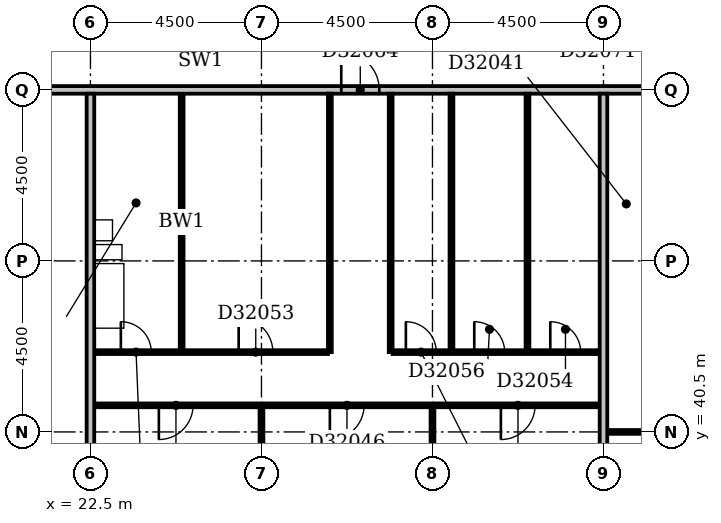
"""IFC4 building model, lengths in metres.
Left out: names, types, materials, properties, quantities, classifications, styles, units other than length and angle.
Written with IfcOpenShell. Run it as: python <this file> out.ifc"""

import sys

from ifc_helpers import new_model, si_unit, direction, frame, frame_2d, origin, place, context, subcontext, project, spatial, rectangle, extrude, element, fill, save


model = new_model("IFC4")
c1 = context("Model", 3, precision=1e-05, world=origin(), true_north=direction((0.0, 1.0)))
c2 = subcontext(c1, "Body", "Model", "MODEL_VIEW")
j1 = project(units=[si_unit("LENGTHUNIT", "METRE"), si_unit("PLANEANGLEUNIT", "RADIAN")], contexts=[c1])
p1 = place(None, origin())
s1 = spatial("IfcSite", under=j1, at=p1, CompositionType="ELEMENT")
p2 = place(p1, origin())
s2 = spatial("IfcBuilding", under=s1, at=p2, CompositionType="ELEMENT")
p3 = place(p2, frame((0.0, 0.0, 130.4)))
s3 = spatial("IfcBuildingStorey", under=s2, at=p3, CompositionType="ELEMENT", Elevation=130.4)
p4 = place(p3, frame((22.5, 36.5, 0.0), z_axis=(0.0, 0.0, 1.0), x_axis=(0.0, 1.0, 0.0)))
e1 = element("IfcWall", 1, at=p4, inside=s3, PredefinedType="PARTITIONING", context=c2, shape_type="SweptSolid", body=[
    extrude(rectangle(XDim=12.9, YDim=0.2, at=frame_2d((6.45, 0.0))), origin(), (0.0, 0.0, 1.0), 3.3),
])
p5 = place(p3, frame((27.0, 36.5, 0.0), z_axis=(0.0, 0.0, 1.0), x_axis=(0.0, 1.0, 0.0)))
e2 = element("IfcWall", 2, at=p5, inside=s3, PredefinedType="PARTITIONING", context=c2, shape_type="SweptSolid", body=[
    extrude(rectangle(XDim=4.65, YDim=0.1, at=frame_2d((2.325, 0.0))), origin(), (0.0, 0.0, 1.0), 2.6),
])
p6 = place(p3, frame((31.5, 36.5, 0.0), z_axis=(0.0, 0.0, 1.0), x_axis=(0.0, 1.0, 0.0)))
e3 = element("IfcWall", 3, at=p6, inside=s3, PredefinedType="PARTITIONING", context=c2, shape_type="SweptSolid", body=[
    extrude(rectangle(XDim=4.65, YDim=0.1, at=frame_2d((2.325, 0.0))), origin(), (0.0, 0.0, 1.0), 3.3),
])
p7 = place(p3, frame((36.0, 36.5, 0.0), z_axis=(0.0, 0.0, 1.0), x_axis=(0.0, 1.0, 0.0)))
e4 = element("IfcWall", 4, at=p7, inside=s3, PredefinedType="PARTITIONING", context=c2, shape_type="SweptSolid", body=[
    extrude(rectangle(XDim=12.9, YDim=0.2, at=frame_2d((6.45, 0.0))), origin(), (0.0, 0.0, 1.0), 2.4),
])
p8 = place(p3, frame((36.1, 40.5, 0.0), z_axis=(0.0, 0.0, 1.0), x_axis=(1.0, 0.0, 0.0)))
e5 = element("IfcWall", 5, at=p8, inside=s3, PredefinedType="PARTITIONING", context=c2, shape_type="SweptSolid", body=[
    extrude(rectangle(XDim=4.3, YDim=0.1, at=frame_2d((2.15, 0.0))), origin(), (0.0, 0.0, 1.0), 3.3),
])
p9 = place(p8, frame((1.7, 0.0, 0.0)))
e6 = element("IfcOpeningElement", 6, at=p9, cuts=e5, PredefinedType="OPENING", context=c2, shape_type="SweptSolid", body=[
    extrude(rectangle(XDim=0.9, YDim=2.1, at=frame_2d((0.45, 1.05))), frame((0.0, 0.062, 0.0), z_axis=(0.0, -1.0, 0.0), x_axis=(1.0, 0.0, 0.0)), (0.0, 0.0, 1.0), 0.124),
])
p10 = place(p3, frame((22.6, 41.2, 0.0), z_axis=(0.0, 0.0, 1.0), x_axis=(1.0, 0.0, 0.0)))
e7 = element("IfcWall", 7, at=p10, inside=s3, PredefinedType="PARTITIONING", context=c2, shape_type="SweptSolid", body=[
    extrude(rectangle(XDim=13.3, YDim=0.1, at=frame_2d((6.65, 0.0))), origin(), (0.0, 0.0, 1.0), 3.3),
])
p11 = place(p10, frame((1.7, 0.0, 0.0)))
e8 = element("IfcOpeningElement", 8, at=p11, cuts=e7, PredefinedType="OPENING", context=c2, shape_type="SweptSolid", body=[
    extrude(rectangle(XDim=0.9, YDim=2.1, at=frame_2d((0.45, 1.05))), frame((0.0, 0.062, 0.0), z_axis=(0.0, -1.0, 0.0), x_axis=(1.0, 0.0, 0.0)), (0.0, 0.0, 1.0), 0.124),
])
p12 = place(p10, frame((6.2, 0.0, 0.0)))
e9 = element("IfcOpeningElement", 9, at=p12, cuts=e7, PredefinedType="OPENING", context=c2, shape_type="SweptSolid", body=[
    extrude(rectangle(XDim=0.9, YDim=2.1, at=frame_2d((0.45, 1.05))), frame((0.0, 0.062, 0.0), z_axis=(0.0, -1.0, 0.0), x_axis=(1.0, 0.0, 0.0)), (0.0, 0.0, 1.0), 0.124),
])
p13 = place(p10, frame((10.7, 0.0, 0.0)))
e10 = element("IfcOpeningElement", 10, at=p13, cuts=e7, PredefinedType="OPENING", context=c2, shape_type="SweptSolid", body=[
    extrude(rectangle(XDim=0.9, YDim=2.1, at=frame_2d((0.45, 1.05))), frame((0.0, 0.062, 0.0), z_axis=(0.0, -1.0, 0.0), x_axis=(1.0, 0.0, 0.0)), (0.0, 0.0, 1.0), 0.124),
])
p14 = place(p3, frame((22.6, 42.6, 0.0), z_axis=(0.0, 0.0, 1.0), x_axis=(1.0, 0.0, 0.0)))
e11 = element("IfcWall", 11, at=p14, inside=s3, PredefinedType="PARTITIONING", context=c2, shape_type="SweptSolid", body=[
    extrude(rectangle(XDim=6.15, YDim=0.1, at=frame_2d((3.075, 0.0))), origin(), (0.0, 0.0, 1.0), 3.3),
])
p15 = place(p14, frame((0.7, 0.0, 0.0)))
e12 = element("IfcOpeningElement", 12, at=p15, cuts=e11, PredefinedType="OPENING", context=c2, shape_type="SweptSolid", body=[
    extrude(rectangle(XDim=0.8, YDim=2.1, at=frame_2d((0.4, 1.05))), frame((0.0, 0.062, 0.0), z_axis=(0.0, -1.0, 0.0), x_axis=(1.0, 0.0, 0.0)), (0.0, 0.0, 1.0), 0.124),
])
p16 = place(p14, frame((3.8, 0.0, 0.0)))
e13 = element("IfcOpeningElement", 13, at=p16, cuts=e11, PredefinedType="OPENING", context=c2, shape_type="SweptSolid", body=[
    extrude(rectangle(XDim=0.9, YDim=2.1, at=frame_2d((0.45, 1.05))), frame((0.0, 0.062, 0.0), z_axis=(0.0, -1.0, 0.0), x_axis=(1.0, 0.0, 0.0)), (0.0, 0.0, 1.0), 0.124),
])
for number, where, z_axis, x_axis in (
    (14, (28.8, 42.6, 0.0), (0.0, 0.0, 1.0), (0.0, 1.0, 0.0)),
    (15, (30.4, 42.6, 0.0), (0.0, 0.0, 1.0), (0.0, 1.0, 0.0)),
):
    element("IfcWall", number, at=place(p3, frame(where, z_axis=z_axis, x_axis=x_axis)), inside=s3, PredefinedType="PARTITIONING", context=c2, shape_type="SweptSolid", body=[
        extrude(rectangle(XDim=6.8, YDim=0.1, at=frame_2d((3.4, 0.0))), origin(), (0.0, 0.0, 1.0), 3.3),
    ])
p17 = place(p3, frame((30.45, 42.6, 0.0), z_axis=(0.0, 0.0, 1.0), x_axis=(1.0, 0.0, 0.0)))
e16 = element("IfcWall", 16, at=p17, inside=s3, PredefinedType="PARTITIONING", context=c2, shape_type="SweptSolid", body=[
    extrude(rectangle(XDim=5.45, YDim=0.1, at=frame_2d((2.725, 0.0))), origin(), (0.0, 0.0, 1.0), 3.3),
])
p18 = place(p17, frame((4.15, 0.0, 0.0)))
e17 = element("IfcOpeningElement", 17, at=p18, cuts=e16, PredefinedType="OPENING", context=c2, shape_type="SweptSolid", body=[
    extrude(rectangle(XDim=0.8, YDim=2.1, at=frame_2d((0.4, 1.05))), frame((0.0, 0.062, 0.0), z_axis=(0.0, -1.0, 0.0), x_axis=(1.0, 0.0, 0.0)), (0.0, 0.0, 1.0), 0.124),
])
p19 = place(p17, frame((0.35, 0.0, 0.0)))
e18 = element("IfcOpeningElement", 18, at=p19, cuts=e16, PredefinedType="OPENING", context=c2, shape_type="SweptSolid", body=[
    extrude(rectangle(XDim=0.8, YDim=2.1, at=frame_2d((0.4, 1.05))), frame((0.0, 0.062, 0.0), z_axis=(0.0, -1.0, 0.0), x_axis=(1.0, 0.0, 0.0)), (0.0, 0.0, 1.0), 0.124),
])
p20 = place(p17, frame((2.15, 0.0, 0.0)))
e19 = element("IfcOpeningElement", 19, at=p20, cuts=e16, PredefinedType="OPENING", context=c2, shape_type="SweptSolid", body=[
    extrude(rectangle(XDim=0.8, YDim=2.1, at=frame_2d((0.4, 1.05))), frame((0.0, 0.062, 0.0), z_axis=(0.0, -1.0, 0.0), x_axis=(1.0, 0.0, 0.0)), (0.0, 0.0, 1.0), 0.124),
])
p21 = place(p3, frame((24.9, 42.65, 0.0), z_axis=(0.0, 0.0, 1.0), x_axis=(0.0, 1.0, 0.0)))
e20 = element("IfcWall", 20, at=p21, inside=s3, PredefinedType="PLUMBINGWALL", context=c2, shape_type="SweptSolid", body=[
    extrude(rectangle(XDim=6.75, YDim=0.1, at=frame_2d((3.375, 0.0))), origin(), (0.0, 0.0, 1.0), 3.3),
])
for number, where, z_axis, x_axis in (
    (21, (32.0, 42.65, 0.0), (0.0, 0.0, 1.0), (0.0, 1.0, 0.0)),
    (22, (34.0, 42.65, 0.0), (0.0, 0.0, 1.0), (0.0, 1.0, 0.0)),
):
    element("IfcWall", number, at=place(p3, frame(where, z_axis=z_axis, x_axis=x_axis)), inside=s3, PredefinedType="PARTITIONING", context=c2, shape_type="SweptSolid", body=[
        extrude(rectangle(XDim=6.75, YDim=0.1, at=frame_2d((3.375, 0.0))), origin(), (0.0, 0.0, 1.0), 3.3),
    ])
p22 = place(p3, frame((9.1, 49.5, 0.0), z_axis=(0.0, 0.0, 1.0), x_axis=(1.0, 0.0, 0.0)))
e23 = element("IfcWall", 23, at=p22, inside=s3, PredefinedType="PARTITIONING", context=c2, shape_type="SweptSolid", body=[
    extrude(rectangle(XDim=28.05, YDim=0.2, at=frame_2d((14.025, 0.0))), origin(), (0.0, 0.0, 1.0), 3.3),
])
p23 = place(p22, frame((20.0, 0.0, 0.0)))
e24 = element("IfcOpeningElement", 24, at=p23, cuts=e23, PredefinedType="OPENING", context=c2, shape_type="SweptSolid", body=[
    extrude(rectangle(XDim=1.0, YDim=2.1, at=frame_2d((0.5, 1.05))), frame((0.0, 0.112, 0.0), z_axis=(0.0, -1.0, 0.0), x_axis=(1.0, 0.0, 0.0)), (0.0, 0.0, 1.0), 0.224),
])
p24 = place(p22, frame((3.9, 0.0, 0.0)))
e25 = element("IfcOpeningElement", 25, at=p24, cuts=e23, PredefinedType="OPENING", context=c2, shape_type="SweptSolid", body=[
    extrude(rectangle(XDim=0.9, YDim=2.1, at=frame_2d((0.45, 1.05))), frame((0.0, 0.112, 0.0), z_axis=(0.0, -1.0, 0.0), x_axis=(1.0, 0.0, 0.0)), (0.0, 0.0, 1.0), 0.224),
])
p25 = place(p11, frame((0.9, 0.0, 0.0), z_axis=(0.0, 0.0, 1.0), x_axis=(-1.0, 0.0, 0.0)))
e26 = element("IfcDoor", 26, at=p25, inside=s3, OperationType="SINGLE_SWING_RIGHT", PredefinedType="DOOR", context=c2, shape_type="SweptSolid", body=[
    extrude(rectangle(XDim=0.9, YDim=2.1, at=frame_2d((0.45, 1.05))), frame((0.0, 0.025, 0.0), z_axis=(0.0, -1.0, 0.0), x_axis=(1.0, 0.0, 0.0)), (0.0, 0.0, 1.0), 0.05),
])
fill(e8, e26)
p26 = place(p12, frame((0.9, 0.0, 0.0), z_axis=(0.0, 0.0, 1.0), x_axis=(-1.0, 0.0, 0.0)))
e27 = element("IfcDoor", 27, at=p26, inside=s3, OperationType="SINGLE_SWING_RIGHT", PredefinedType="DOOR", context=c2, shape_type="SweptSolid", body=[
    extrude(rectangle(XDim=0.9, YDim=2.1, at=frame_2d((0.45, 1.05))), frame((0.0, 0.025, 0.0), z_axis=(0.0, -1.0, 0.0), x_axis=(1.0, 0.0, 0.0)), (0.0, 0.0, 1.0), 0.05),
])
fill(e9, e27)
p27 = place(p13, frame((0.9, 0.0, 0.0), z_axis=(0.0, 0.0, 1.0), x_axis=(-1.0, 0.0, 0.0)))
e28 = element("IfcDoor", 28, at=p27, inside=s3, OperationType="SINGLE_SWING_RIGHT", PredefinedType="DOOR", context=c2, shape_type="SweptSolid", body=[
    extrude(rectangle(XDim=0.9, YDim=2.1, at=frame_2d((0.45, 1.05))), frame((0.0, 0.025, 0.0), z_axis=(0.0, -1.0, 0.0), x_axis=(1.0, 0.0, 0.0)), (0.0, 0.0, 1.0), 0.05),
])
fill(e10, e28)
p28 = place(p15, origin())
e29 = element("IfcDoor", 29, at=p28, inside=s3, OperationType="SINGLE_SWING_LEFT", PredefinedType="DOOR", context=c2, shape_type="SweptSolid", body=[
    extrude(rectangle(XDim=0.8, YDim=2.1, at=frame_2d((0.4, 1.05))), frame((0.0, 0.025, 0.0), z_axis=(0.0, -1.0, 0.0), x_axis=(1.0, 0.0, 0.0)), (0.0, 0.0, 1.0), 0.05),
])
fill(e12, e29)
p29 = place(p16, origin())
e30 = element("IfcDoor", 30, at=p29, inside=s3, OperationType="SINGLE_SWING_LEFT", PredefinedType="DOOR", context=c2, shape_type="SweptSolid", body=[
    extrude(rectangle(XDim=0.9, YDim=2.1, at=frame_2d((0.45, 1.05))), frame((0.0, 0.025, 0.0), z_axis=(0.0, -1.0, 0.0), x_axis=(1.0, 0.0, 0.0)), (0.0, 0.0, 1.0), 0.05),
])
fill(e13, e30)
p30 = place(p18, origin())
e31 = element("IfcDoor", 31, at=p30, inside=s3, OperationType="SINGLE_SWING_LEFT", PredefinedType="DOOR", context=c2, shape_type="SweptSolid", body=[
    extrude(rectangle(XDim=0.8, YDim=2.1, at=frame_2d((0.4, 1.05))), frame((0.0, 0.025, 0.0), z_axis=(0.0, -1.0, 0.0), x_axis=(1.0, 0.0, 0.0)), (0.0, 0.0, 1.0), 0.05),
])
fill(e17, e31)
p31 = place(p19, origin())
e32 = element("IfcDoor", 32, at=p31, inside=s3, OperationType="SINGLE_SWING_LEFT", PredefinedType="DOOR", context=c2, shape_type="SweptSolid", body=[
    extrude(rectangle(XDim=0.8, YDim=2.1, at=frame_2d((0.4, 1.05))), frame((0.0, 0.025, 0.0), z_axis=(0.0, -1.0, 0.0), x_axis=(1.0, 0.0, 0.0)), (0.0, 0.0, 1.0), 0.05),
])
fill(e18, e32)
p32 = place(p20, origin())
e33 = element("IfcDoor", 33, at=p32, inside=s3, OperationType="SINGLE_SWING_LEFT", PredefinedType="DOOR", context=c2, shape_type="SweptSolid", body=[
    extrude(rectangle(XDim=0.8, YDim=2.1, at=frame_2d((0.4, 1.05))), frame((0.0, 0.025, 0.0), z_axis=(0.0, -1.0, 0.0), x_axis=(1.0, 0.0, 0.0)), (0.0, 0.0, 1.0), 0.05),
])
fill(e19, e33)
p33 = place(p23, origin())
e34 = element("IfcDoor", 34, at=p33, inside=s3, OperationType="SINGLE_SWING_LEFT", PredefinedType="DOOR", context=c2, shape_type="SweptSolid", body=[
    extrude(rectangle(XDim=1.0, YDim=2.1, at=frame_2d((0.5, 1.05))), frame((0.0, 0.025, 0.0), z_axis=(0.0, -1.0, 0.0), x_axis=(1.0, 0.0, 0.0)), (0.0, 0.0, 1.0), 0.05),
])
fill(e24, e34)
save(model, sys.argv[1])
